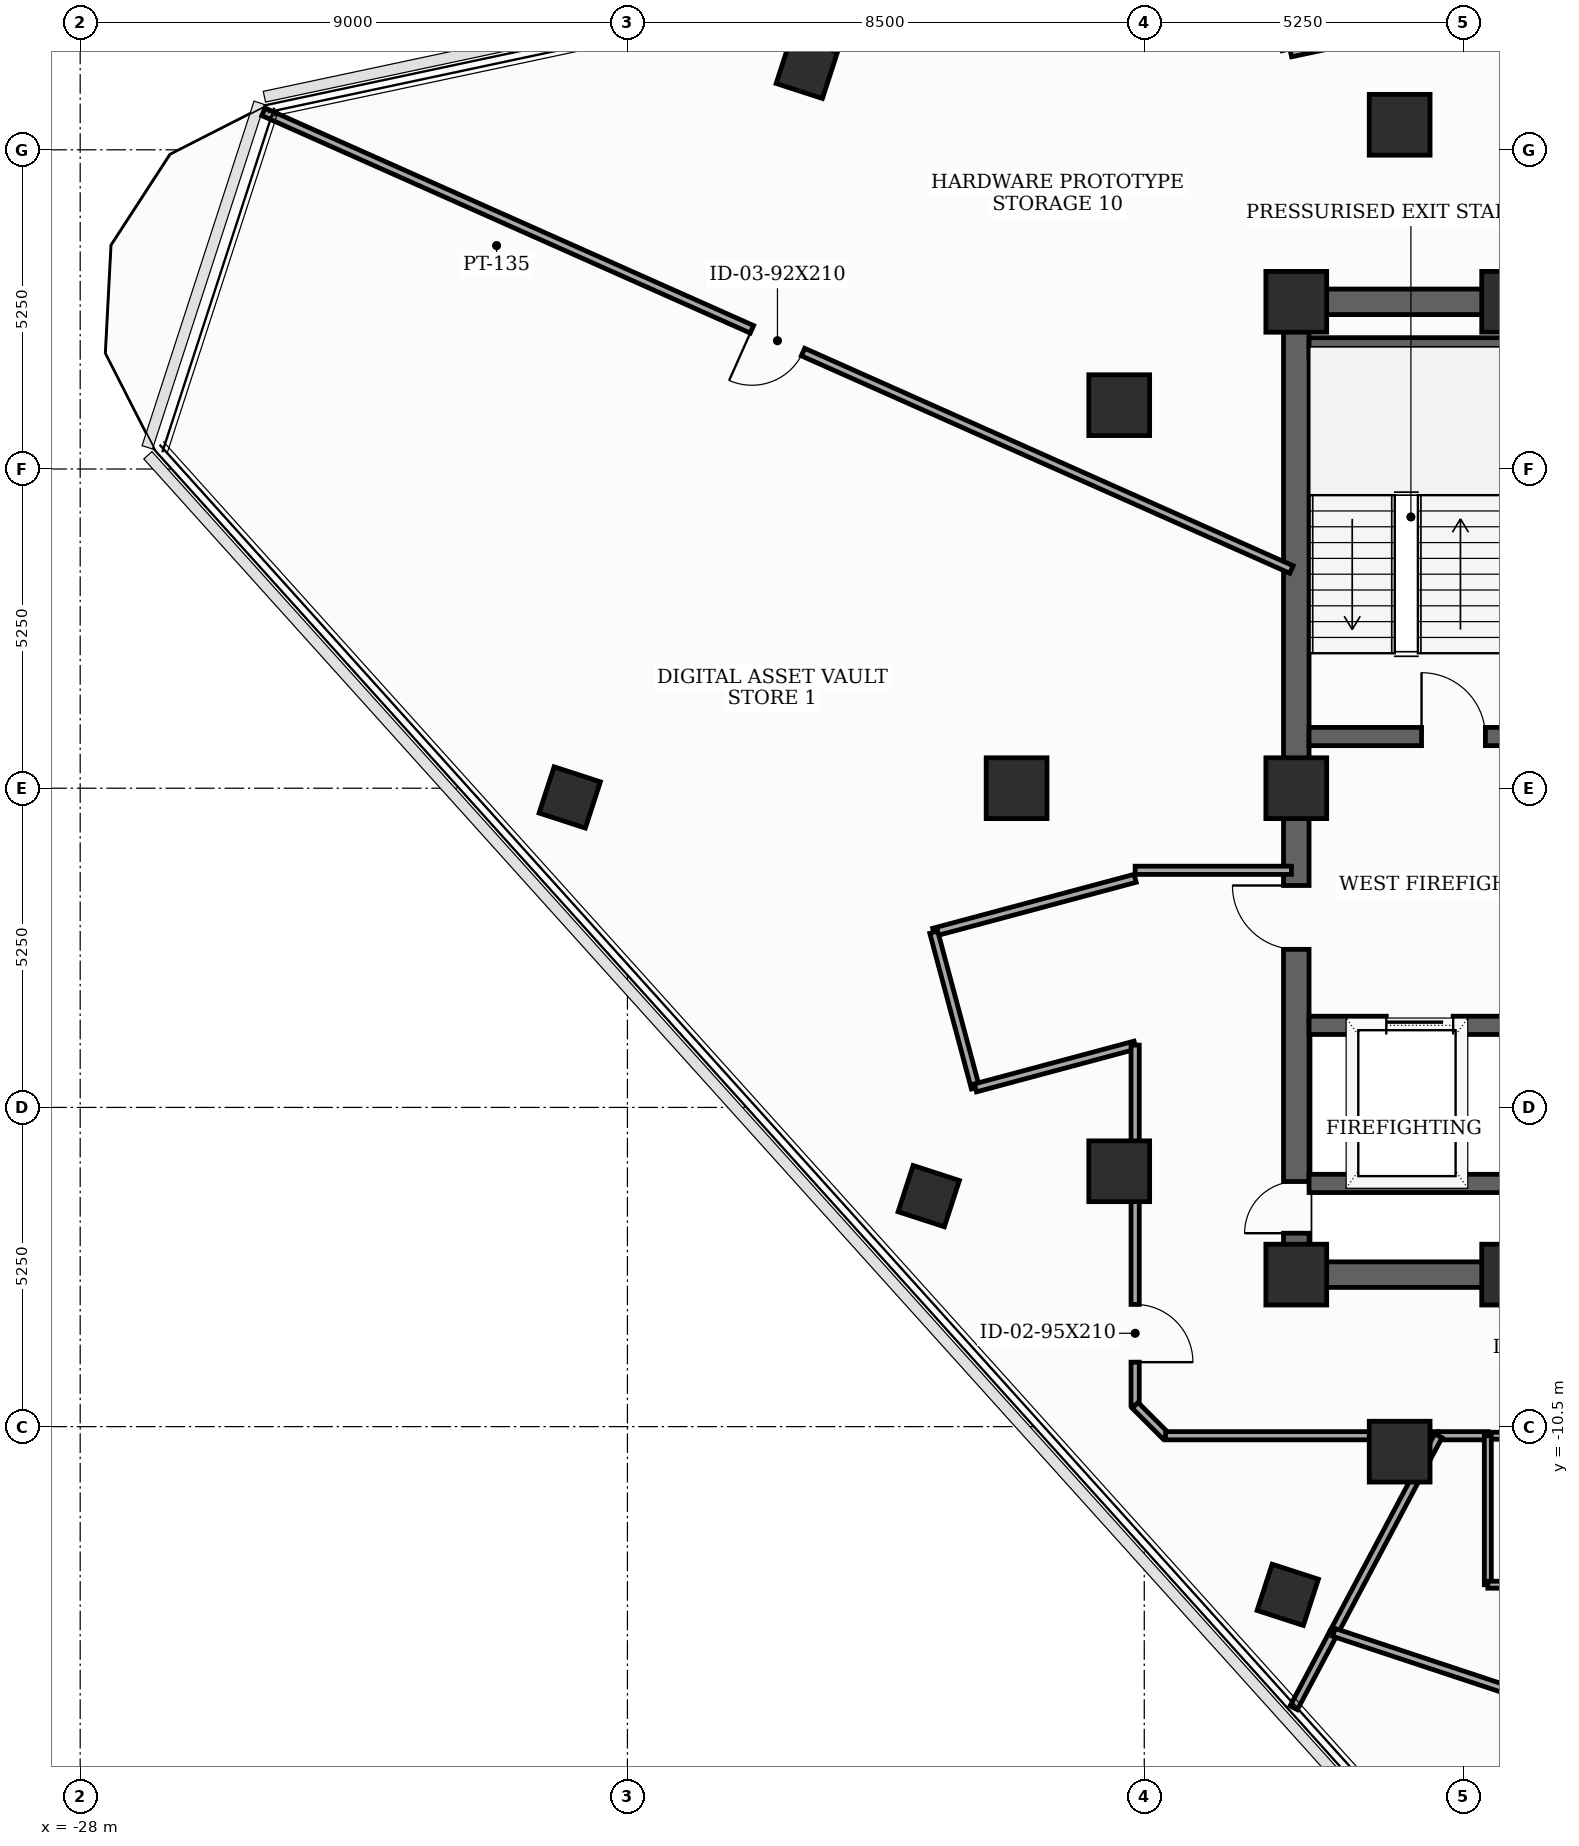
"""IFC4 building model, lengths in metres.
Left out: names, types, materials, properties, quantities, classifications, styles, units other than length and angle.
Written with IfcOpenShell. Run it as: python <this file> out.ifc"""

import sys

from ifc_helpers import new_model, si_unit, direction, frame, frame_2d, origin, origin_2d, place, context, subcontext, project, spatial, rectangle, extrude, element, fill, save


model = new_model("IFC4")
c1 = context("Model", 3, precision=1e-05, world=origin(), true_north=direction((0.0, 1.0)))
c2 = subcontext(c1, "Body", "Model", "MODEL_VIEW")
j1 = project(units=[si_unit("LENGTHUNIT", "METRE"), si_unit("PLANEANGLEUNIT", "RADIAN")], contexts=[c1])
p1 = place(None, origin())
s1 = spatial("IfcSite", under=j1, at=p1, CompositionType="ELEMENT")
p2 = place(p1, origin())
s2 = spatial("IfcBuilding", under=s1, at=p2, CompositionType="ELEMENT")
p3 = place(p2, frame((0.0, 0.0, 298.0)))
s3 = spatial("IfcBuildingStorey", under=s2, at=p3, CompositionType="ELEMENT", Elevation=298.0)
for number, where, z_axis, x_axis in (
    (1, (-8.0, -8.0, 0.0), (0.0, 0.0, 1.0), (1.0, 0.0, 0.0)),
    (2, (-4.45, -8.0, 0.0), (0.0, 0.0, 1.0), (1.0, 0.0, 0.0)),
    (3, (-4.45, 8.0, 0.0), (0.0, 0.0, 1.0), (1.0, 0.0, 0.0)),
    (4, (-8.0, 8.0, 0.0), (0.0, 0.0, 1.0), (1.0, 0.0, 0.0)),
    (5, (-8.0, 0.0, 0.0), (0.0, 0.0, 1.0), (1.0, 0.0, 0.0)),
    (6, (-6.3, 10.912, 0.0), (0.0, 0.0, 1.0), (1.0, 0.0, 0.0)),
    (7, (-10.912, 6.3, 0.0), (0.0, 0.0, 1.0), (1.0, 0.0, 0.0)),
    (8, (-12.6, 0.0, 0.0), (0.0, 0.0, 1.0), (1.0, 0.0, 0.0)),
    (9, (-10.912, -6.3, 0.0), (0.0, 0.0, 1.0), (1.0, 0.0, 0.0)),
    (10, (-6.3, -10.912, 0.0), (0.0, 0.0, 1.0), (1.0, 0.0, 0.0)),
):
    element("IfcColumn", number, at=place(p3, frame(where, z_axis=z_axis, x_axis=x_axis)), inside=s3, PredefinedType="COLUMN", context=c2, shape_type="SweptSolid", body=[
        extrude(rectangle(XDim=1.0, YDim=1.0, at=origin_2d()), origin(), (0.0, 0.0, 1.0), 3.7),
    ])
for number, where, z_axis, x_axis in (
    (11, (-16.05, 11.848, 0.0), (0.0, 0.0, 1.0), (0.309, 0.951, 0.0)),
    (12, (-19.949, -0.151, 0.0), (0.0, 0.0, 1.0), (0.309, 0.951, 0.0)),
    (13, (-14.045, -6.709, 0.0), (0.0, 0.0, 1.0), (0.309, 0.951, 0.0)),
    (14, (-8.14, -13.266, 0.0), (0.0, 0.0, 1.0), (0.309, 0.951, 0.0)),
):
    element("IfcColumn", number, at=place(p3, frame(where, z_axis=z_axis, x_axis=x_axis)), inside=s3, PredefinedType="COLUMN", context=c2, shape_type="SweptSolid", body=[
        extrude(rectangle(XDim=0.8, YDim=0.8, at=origin_2d()), origin(), (0.0, 0.0, 1.0), 3.7),
    ])
p4 = place(p3, frame((2.459, 14.402, 0.0), z_axis=(0.0, 0.0, 1.0), x_axis=(-0.978149082982, -0.207904717268, 0.0)))
e15 = element("IfcWall", 15, at=p4, inside=s3, PredefinedType="SOLIDWALL", context=c2, shape_type="SweptSolid", body=[
    extrude(rectangle(XDim=10.8, YDim=0.26, at=frame_2d((5.4, 0.0))), origin(), (0.0, 0.0, 1.0), 3.5),
])
p5 = place(p4, frame((1.6, 0.0, 0.85)))
e16 = element("IfcOpeningElement", 16, at=p5, cuts=e15, PredefinedType="OPENING", context=c2, shape_type="SweptSolid", body=[
    extrude(rectangle(XDim=2.2, YDim=1.25, at=frame_2d((1.1, 0.625))), frame((0.0, 0.14, 0.0), z_axis=(0.0, -1.0, 0.0), x_axis=(1.0, 0.0, 0.0)), (0.0, 0.0, 1.0), 0.28),
])
p6 = place(p4, frame((7.0, 0.0, 0.85)))
e17 = element("IfcOpeningElement", 17, at=p6, cuts=e15, PredefinedType="OPENING", context=c2, shape_type="SweptSolid", body=[
    extrude(rectangle(XDim=2.2, YDim=1.25, at=frame_2d((1.1, 0.625))), frame((0.0, 0.14, 0.0), z_axis=(0.0, -1.0, 0.0), x_axis=(1.0, 0.0, 0.0)), (0.0, 0.0, 1.0), 0.28),
])
p7 = place(p3, frame((-8.0, -8.0, 0.0), z_axis=(0.0, 0.0, 1.0), x_axis=(0.0, 1.0, 0.0)))
e18 = element("IfcWall", 18, at=p7, inside=s3, PredefinedType="SHEAR", context=c2, shape_type="SweptSolid", body=[
    extrude(rectangle(XDim=16.0, YDim=0.42, at=frame_2d((8.0, 0.0))), origin(), (0.0, 0.0, 1.0), 3.5),
])
p8 = place(p7, frame((0.681, 0.0, 0.0)))
e19 = element("IfcOpeningElement", 19, at=p8, cuts=e18, PredefinedType="OPENING", context=c2, shape_type="SweptSolid", body=[
    extrude(rectangle(XDim=0.85, YDim=2.02, at=frame_2d((0.425, 1.01))), frame((0.0, 0.22, 0.0), z_axis=(0.0, -1.0, 0.0), x_axis=(1.0, 0.0, 0.0)), (0.0, 0.0, 1.0), 0.44),
])
p9 = place(p7, frame((5.35, 0.0, 0.0)))
e20 = element("IfcOpeningElement", 20, at=p9, cuts=e18, PredefinedType="OPENING", context=c2, shape_type="SweptSolid", body=[
    extrude(rectangle(XDim=1.05, YDim=2.15, at=frame_2d((0.525, 1.075))), frame((0.0, 0.22, 0.0), z_axis=(0.0, -1.0, 0.0), x_axis=(1.0, 0.0, 0.0)), (0.0, 0.0, 1.0), 0.44),
])
p10 = place(p3, frame((-8.0, -8.0, 0.0), z_axis=(0.0, 0.0, 1.0), x_axis=(1.0, 0.0, 0.0)))
e21 = element("IfcWall", 21, at=p10, inside=s3, PredefinedType="SHEAR", context=c2, shape_type="SweptSolid", body=[
    extrude(rectangle(XDim=16.0, YDim=0.42, at=frame_2d((8.0, 0.0))), origin(), (0.0, 0.0, 1.0), 3.5),
])
p11 = place(p10, frame((4.6, 0.0, 0.0)))
e22 = element("IfcOpeningElement", 22, at=p11, cuts=e21, PredefinedType="OPENING", context=c2, shape_type="SweptSolid", body=[
    extrude(rectangle(XDim=0.95, YDim=2.1, at=frame_2d((0.475, 1.05))), frame((0.0, 0.22, 0.0), z_axis=(0.0, -1.0, 0.0), x_axis=(1.0, 0.0, 0.0)), (0.0, 0.0, 1.0), 0.44),
])
p12 = place(p10, frame((7.52, 0.0, 0.0)))
e23 = element("IfcOpeningElement", 23, at=p12, cuts=e21, PredefinedType="OPENING", context=c2, shape_type="SweptSolid", body=[
    extrude(rectangle(XDim=0.95, YDim=2.1, at=frame_2d((0.475, 1.05))), frame((0.0, 0.22, 0.0), z_axis=(0.0, -1.0, 0.0), x_axis=(1.0, 0.0, 0.0)), (0.0, 0.0, 1.0), 0.44),
])
p13 = place(p10, frame((10.45, 0.0, 0.0)))
e24 = element("IfcOpeningElement", 24, at=p13, cuts=e21, PredefinedType="OPENING", context=c2, shape_type="SweptSolid", body=[
    extrude(rectangle(XDim=0.95, YDim=2.1, at=frame_2d((0.475, 1.05))), frame((0.0, 0.22, 0.0), z_axis=(0.0, -1.0, 0.0), x_axis=(1.0, 0.0, 0.0)), (0.0, 0.0, 1.0), 0.44),
])
p14 = place(p3, frame((-8.0, 8.0, 0.0), z_axis=(0.0, 0.0, 1.0), x_axis=(1.0, 0.0, 0.0)))
e25 = element("IfcWall", 25, at=p14, inside=s3, PredefinedType="SHEAR", context=c2, shape_type="SweptSolid", body=[
    extrude(rectangle(XDim=16.0, YDim=0.42, at=frame_2d((8.0, 0.0))), origin(), (0.0, 0.0, 1.0), 3.5),
])
p15 = place(p14, frame((7.1, 0.0, 0.0)))
e26 = element("IfcOpeningElement", 26, at=p15, cuts=e25, PredefinedType="OPENING", context=c2, shape_type="SweptSolid", body=[
    extrude(rectangle(XDim=1.8, YDim=2.15, at=frame_2d((0.9, 1.075))), frame((0.0, 0.22, 0.0), z_axis=(0.0, -1.0, 0.0), x_axis=(1.0, 0.0, 0.0)), (0.0, 0.0, 1.0), 0.44),
])
p16 = place(p3, frame((-7.79, 0.85, 0.0), z_axis=(0.0, 0.0, 1.0), x_axis=(1.0, 0.0, 0.0)))
e27 = element("IfcWall", 27, at=p16, inside=s3, PredefinedType="SHEAR", context=c2, shape_type="SweptSolid", body=[
    extrude(rectangle(XDim=3.34, YDim=0.3, at=frame_2d((1.67, 0.0))), origin(), (0.0, 0.0, 1.0), 3.5),
])
p17 = place(p16, frame((1.85, 0.0, 0.0)))
e28 = element("IfcOpeningElement", 28, at=p17, cuts=e27, PredefinedType="OPENING", context=c2, shape_type="SweptSolid", body=[
    extrude(rectangle(XDim=1.05, YDim=2.15, at=frame_2d((0.525, 1.075))), frame((0.0, 0.16, 0.0), z_axis=(0.0, -1.0, 0.0), x_axis=(1.0, 0.0, 0.0)), (0.0, 0.0, 1.0), 0.32),
])
p18 = place(p3, frame((-7.79, 7.26, 0.0), z_axis=(0.0, 0.0, 1.0), x_axis=(1.0, 0.0, 0.0)))
e29 = element("IfcWall", 29, at=p18, inside=s3, PredefinedType="SHEAR", context=c2, shape_type="SweptSolid", body=[
    extrude(rectangle(XDim=3.34, YDim=0.3, at=frame_2d((1.67, 0.0))), origin(), (0.0, 0.0, 1.0), 3.5),
])
p19 = place(p3, frame((-7.79, -3.9, 0.0), z_axis=(0.0, 0.0, 1.0), x_axis=(1.0, 0.0, 0.0)))
e30 = element("IfcWall", 30, at=p19, inside=s3, PredefinedType="SHEAR", context=c2, shape_type="SweptSolid", body=[
    extrude(rectangle(XDim=3.34, YDim=0.3, at=frame_2d((1.67, 0.0))), origin(), (0.0, 0.0, 1.0), 3.5),
])
p20 = place(p19, frame((1.27, 0.0, 0.0)))
e31 = element("IfcOpeningElement", 31, at=p20, cuts=e30, PredefinedType="OPENING", context=c2, shape_type="SweptSolid", body=[
    extrude(rectangle(XDim=1.1, YDim=2.1, at=frame_2d((0.55, 1.05))), frame((0.0, 0.16, 0.0), z_axis=(0.0, -1.0, 0.0), x_axis=(1.0, 0.0, 0.0)), (0.0, 0.0, 1.0), 0.32),
])
p21 = place(p3, frame((-7.79, -6.5, 0.0), z_axis=(0.0, 0.0, 1.0), x_axis=(1.0, 0.0, 0.0)))
e32 = element("IfcWall", 32, at=p21, inside=s3, PredefinedType="SHEAR", context=c2, shape_type="SweptSolid", body=[
    extrude(rectangle(XDim=3.34, YDim=0.3, at=frame_2d((1.67, 0.0))), origin(), (0.0, 0.0, 1.0), 3.5),
])
p22 = place(p3, frame((-8.08, -1.35, 0.0), z_axis=(0.0, 0.0, 1.0), x_axis=(-1.0, 0.0, 0.0)))
e33 = element("IfcWall", 33, at=p22, inside=s3, PredefinedType="PARTITIONING", context=c2, shape_type="SweptSolid", body=[
    extrude(rectangle(XDim=2.57, YDim=0.135, at=frame_2d((1.285, 0.0))), origin(), (0.0, 0.0, 1.0), 2.885),
])
p23 = place(p3, frame((-10.65, -1.482, 0.0), z_axis=(0.0, 0.0, 1.0), x_axis=(-0.965961397105, -0.2586862565, 0.0)))
e34 = element("IfcWall", 34, at=p23, inside=s3, PredefinedType="PARTITIONING", context=c2, shape_type="SweptSolid", body=[
    extrude(rectangle(XDim=3.429, YDim=0.135, at=frame_2d((1.714, 0.0))), origin(), (0.0, 0.0, 1.0), 2.885),
])
p24 = place(p3, frame((-13.962, -2.369, 0.0), z_axis=(0.0, 0.0, 1.0), x_axis=(0.258413725385, -0.966034340245, 0.0)))
e35 = element("IfcWall", 35, at=p24, inside=s3, PredefinedType="PARTITIONING", context=c2, shape_type="SweptSolid", body=[
    extrude(rectangle(XDim=2.65, YDim=0.135, at=frame_2d((1.325, 0.0))), origin(), (0.0, 0.0, 1.0), 3.5),
])
p25 = place(p3, frame((-13.277, -4.929, 0.0), z_axis=(0.0, 0.0, 1.0), x_axis=(0.965934830229, 0.258785439601, 0.0)))
e36 = element("IfcWall", 36, at=p25, inside=s3, PredefinedType="PARTITIONING", context=c2, shape_type="SweptSolid", body=[
    extrude(rectangle(XDim=2.72, YDim=0.135, at=frame_2d((1.36, 0.0))), origin(), (0.0, 0.0, 1.0), 2.885),
])
p26 = place(p3, frame((-10.65, -4.225, 0.0), z_axis=(0.0, 0.0, 1.0), x_axis=(0.0, -1.0, 0.0)))
e37 = element("IfcWall", 37, at=p26, inside=s3, PredefinedType="PARTITIONING", context=c2, shape_type="SweptSolid", body=[
    extrude(rectangle(XDim=5.925, YDim=0.135, at=frame_2d((2.962, 0.0))), origin(), (0.0, 0.0, 1.0), 2.885),
])
p27 = place(p26, frame((4.265, 0.0, 0.0)))
e38 = element("IfcOpeningElement", 38, at=p27, cuts=e37, PredefinedType="OPENING", context=c2, shape_type="SweptSolid", body=[
    extrude(rectangle(XDim=0.95, YDim=2.1, at=frame_2d((0.475, 1.05))), frame((0.0, 0.077, 0.0), z_axis=(0.0, -1.0, 0.0), x_axis=(1.0, 0.0, 0.0)), (0.0, 0.0, 1.0), 0.155),
])
p28 = place(p3, frame((-10.65, -10.15, 0.0), z_axis=(0.0, 0.0, 1.0), x_axis=(0.707106781187, -0.707106781187, 0.0)))
e39 = element("IfcWall", 39, at=p28, inside=s3, PredefinedType="PARTITIONING", context=c2, shape_type="SweptSolid", body=[
    extrude(rectangle(XDim=0.707, YDim=0.135, at=frame_2d((0.354, 0.0))), origin(), (0.0, 0.0, 1.0), 3.035),
])
p29 = place(p3, frame((-10.15, -10.65, 0.0), z_axis=(0.0, 0.0, 1.0), x_axis=(1.0, 0.0, 0.0)))
e40 = element("IfcWall", 40, at=p29, inside=s3, PredefinedType="PARTITIONING", context=c2, shape_type="SweptSolid", body=[
    extrude(rectangle(XDim=4.487, YDim=0.135, at=frame_2d((2.243, 0.0))), origin(), (0.0, 0.0, 1.0), 2.885),
])
p30 = place(p3, frame((-4.85, -10.65, 0.0), z_axis=(0.0, 0.0, 1.0), x_axis=(1.0, 0.0, 0.0)))
e41 = element("IfcWall", 41, at=p30, inside=s3, PredefinedType="PARTITIONING", context=c2, shape_type="SweptSolid", body=[
    extrude(rectangle(XDim=2.4, YDim=0.115, at=frame_2d((1.2, 0.0))), origin(), (0.0, 0.0, 1.0), 3.5),
])
p31 = place(p30, frame((0.74, 0.0, 0.0)))
e42 = element("IfcOpeningElement", 42, at=p31, cuts=e41, PredefinedType="OPENING", context=c2, shape_type="SweptSolid", body=[
    extrude(rectangle(XDim=0.92, YDim=2.1, at=frame_2d((0.46, 1.05))), frame((0.0, 0.067, 0.0), z_axis=(0.0, -1.0, 0.0), x_axis=(1.0, 0.0, 0.0)), (0.0, 0.0, 1.0), 0.135),
])
p32 = place(p3, frame((-5.663, -10.65, 0.0), z_axis=(0.0, 0.0, 1.0), x_axis=(1.0, 0.0, 0.0)))
e43 = element("IfcWall", 43, at=p32, inside=s3, PredefinedType="PARTITIONING", context=c2, shape_type="SweptSolid", body=[
    extrude(rectangle(XDim=0.813, YDim=0.135, at=frame_2d((0.406, 0.0))), origin(), (0.0, 0.0, 1.0), 3.5),
])
p33 = place(p3, frame((-7.382, -13.884, 0.0), z_axis=(0.0, 0.0, 1.0), x_axis=(0.469338791783, 0.88301817565, 0.0)))
e44 = element("IfcWall", 44, at=p33, inside=s3, PredefinedType="PARTITIONING", context=c2, shape_type="SweptSolid", body=[
    extrude(rectangle(XDim=3.663, YDim=0.135, at=frame_2d((1.831, 0.0))), origin(), (0.0, 0.0, 1.0), 2.885),
])
p34 = place(p3, frame((-8.042, -15.124, 0.0), z_axis=(0.0, 0.0, 1.0), x_axis=(0.469595679185, 0.882881587808, 0.0)))
e45 = element("IfcWall", 45, at=p34, inside=s3, PredefinedType="PARTITIONING", context=c2, shape_type="SweptSolid", body=[
    extrude(rectangle(XDim=1.405, YDim=0.135, at=frame_2d((0.702, 0.0))), origin(), (0.0, 0.0, 1.0), 3.035),
])
p35 = place(p3, frame((-8.08, 3.597, 0.0), z_axis=(0.0, 0.0, 1.0), x_axis=(-0.913542590258, 0.406743083266, 0.0)))
e46 = element("IfcWall", 46, at=p35, inside=s3, PredefinedType="PARTITIONING", context=c2, shape_type="SweptSolid", body=[
    extrude(rectangle(XDim=18.505, YDim=0.135, at=frame_2d((9.252, 0.0))), origin(), (0.0, 0.0, 1.0), 2.885),
])
p36 = place(p35, frame((8.792, 0.0, 0.0)))
e47 = element("IfcOpeningElement", 47, at=p36, cuts=e46, PredefinedType="OPENING", context=c2, shape_type="SweptSolid", body=[
    extrude(rectangle(XDim=0.92, YDim=2.1, at=frame_2d((0.46, 1.05))), frame((0.0, 0.077, 0.0), z_axis=(0.0, -1.0, 0.0), x_axis=(1.0, 0.0, 0.0)), (0.0, 0.0, 1.0), 0.155),
])
p37 = place(p3, frame((-4.85, -10.65, 0.0), z_axis=(0.0, 0.0, 1.0), x_axis=(0.0, -1.0, 0.0)))
e48 = element("IfcWall", 48, at=p37, inside=s3, PredefinedType="PARTITIONING", context=c2, shape_type="SweptSolid", body=[
    extrude(rectangle(XDim=2.45, YDim=0.115, at=frame_2d((1.225, 0.0))), origin(), (0.0, 0.0, 1.0), 2.885),
])
p38 = place(p3, frame((-4.85, -13.1, 0.0), z_axis=(0.0, 0.0, 1.0), x_axis=(1.0, 0.0, 0.0)))
e49 = element("IfcWall", 49, at=p38, inside=s3, PredefinedType="PARTITIONING", context=c2, shape_type="SweptSolid", body=[
    extrude(rectangle(XDim=2.4, YDim=0.115, at=frame_2d((1.2, 0.0))), origin(), (0.0, 0.0, 1.0), 3.5),
])
p39 = place(p3, frame((-7.382, -13.884, 0.0), z_axis=(0.0, 0.0, 1.0), x_axis=(0.949247116003, -0.314531258795, 0.0)))
e50 = element("IfcWall", 50, at=p39, inside=s3, PredefinedType="PARTITIONING", context=c2, shape_type="SweptSolid", body=[
    extrude(rectangle(XDim=5.7, YDim=0.135, at=frame_2d((2.85, 0.0))), origin(), (0.0, 0.0, 1.0), 3.035),
])
p40 = place(p8, origin())
e51 = element("IfcDoor", 51, at=p40, inside=s3, OperationType="SINGLE_SWING_LEFT", PredefinedType="TRAPDOOR", context=c2, shape_type="SweptSolid", body=[
    extrude(rectangle(XDim=0.85, YDim=2.02, at=frame_2d((0.425, 1.01))), frame((0.0, 0.025, 0.0), z_axis=(0.0, -1.0, 0.0), x_axis=(1.0, 0.0, 0.0)), (0.0, 0.0, 1.0), 0.05),
])
fill(e19, e51)
p41 = place(p9, origin())
e52 = element("IfcDoor", 52, at=p41, inside=s3, OperationType="SINGLE_SWING_RIGHT", PredefinedType="DOOR", context=c2, shape_type="SweptSolid", body=[
    extrude(rectangle(XDim=1.05, YDim=2.15, at=frame_2d((0.525, 1.075))), frame((0.0, 0.025, 0.0), z_axis=(0.0, -1.0, 0.0), x_axis=(1.0, 0.0, 0.0)), (0.0, 0.0, 1.0), 0.05),
])
fill(e20, e52)
p42 = place(p17, origin())
e53 = element("IfcDoor", 53, at=p42, inside=s3, OperationType="SINGLE_SWING_LEFT", PredefinedType="DOOR", context=c2, shape_type="SweptSolid", body=[
    extrude(rectangle(XDim=1.05, YDim=2.15, at=frame_2d((0.525, 1.075))), frame((0.0, 0.025, 0.0), z_axis=(0.0, -1.0, 0.0), x_axis=(1.0, 0.0, 0.0)), (0.0, 0.0, 1.0), 0.05),
])
fill(e28, e53)
p43 = place(p20, origin())
e54 = element("IfcDoor", 54, at=p43, inside=s3, OperationType="SLIDING_TO_LEFT", PredefinedType="DOOR", context=c2, shape_type="SweptSolid", body=[
    extrude(rectangle(XDim=1.1, YDim=2.1, at=frame_2d((0.55, 1.05))), frame((0.0, 0.025, 0.0), z_axis=(0.0, -1.0, 0.0), x_axis=(1.0, 0.0, 0.0)), (0.0, 0.0, 1.0), 0.05),
])
fill(e31, e54)
p44 = place(p27, origin())
e55 = element("IfcDoor", 55, at=p44, inside=s3, OperationType="SINGLE_SWING_RIGHT", PredefinedType="DOOR", context=c2, shape_type="SweptSolid", body=[
    extrude(rectangle(XDim=0.95, YDim=2.1, at=frame_2d((0.475, 1.05))), frame((0.0, 0.025, 0.0), z_axis=(0.0, -1.0, 0.0), x_axis=(1.0, 0.0, 0.0)), (0.0, 0.0, 1.0), 0.05),
])
fill(e38, e55)
p45 = place(p36, origin())
e56 = element("IfcDoor", 56, at=p45, inside=s3, OperationType="SINGLE_SWING_RIGHT", PredefinedType="DOOR", context=c2, shape_type="SweptSolid", body=[
    extrude(rectangle(XDim=0.92, YDim=2.1, at=frame_2d((0.46, 1.05))), frame((0.0, 0.025, 0.0), z_axis=(0.0, -1.0, 0.0), x_axis=(1.0, 0.0, 0.0)), (0.0, 0.0, 1.0), 0.05),
])
fill(e47, e56)
save(model, sys.argv[1])
